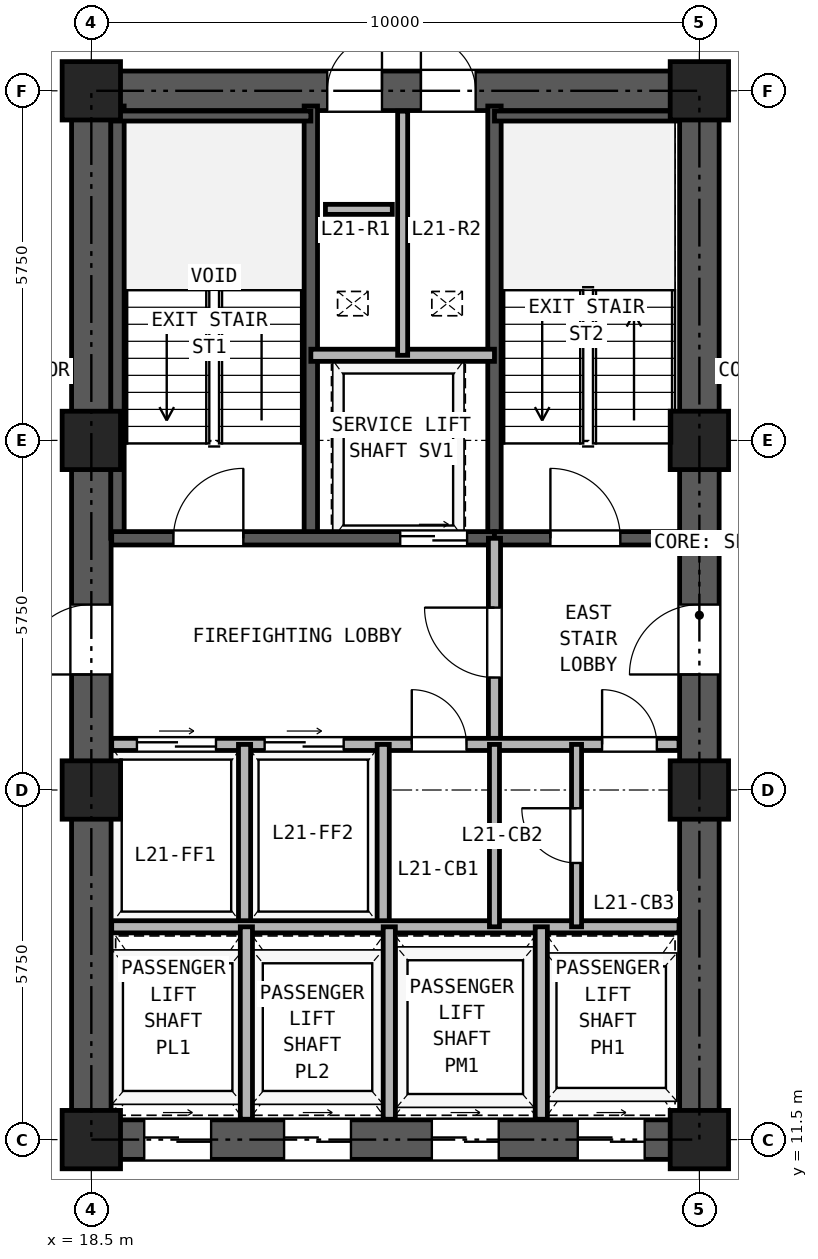
"""IFC4 building model, lengths in metres.
Left out: names, types, materials, properties, quantities, classifications, styles, units other than length and angle.
Written with IfcOpenShell. Run it as: python <this file> out.ifc"""

import sys

from ifc_helpers import new_model, si_unit, direction, frame, frame_2d, origin, origin_2d, place, context, subcontext, project, spatial, rectangle, hollow_rectangle, extrude, source, transform, mapped, element, fill, save


model = new_model("IFC4")
c1 = context("Model", 3, precision=1e-05, world=origin(), true_north=direction((0.0, 1.0)))
c2 = subcontext(c1, "Body", "Model", "MODEL_VIEW")
j1 = project(units=[si_unit("LENGTHUNIT", "METRE"), si_unit("PLANEANGLEUNIT", "RADIAN")], contexts=[c1])
p1 = place(None, origin())
s1 = spatial("IfcSite", under=j1, at=p1, CompositionType="ELEMENT")
p2 = place(p1, origin())
s2 = spatial("IfcBuilding", under=s1, at=p2, CompositionType="ELEMENT")
p3 = place(p2, frame((0.0, 0.0, 81.0)))
s3 = spatial("IfcBuildingStorey", under=s2, at=p3, CompositionType="ELEMENT", Elevation=81.0)
m1 = source(origin(), c2, "Body", "SweptSolid", [
    extrude(hollow_rectangle(XDim=0.96, YDim=0.96, WallThickness=0.06, at=origin_2d()), origin(), (0.0, 0.0, 1.0), 3.32),
])
for number, where, z_axis, x_axis in (
    (1, (18.5, 11.5, 0.0), (0.0, 0.0, 1.0), (1.0, 0.0, 0.0)),
    (2, (18.5, 17.25, 0.0), (0.0, 0.0, 1.0), (1.0, 0.0, 0.0)),
    (3, (18.5, 23.0, 0.0), (0.0, 0.0, 1.0), (1.0, 0.0, 0.0)),
    (4, (18.5, 28.75, 0.0), (0.0, 0.0, 1.0), (1.0, 0.0, 0.0)),
    (5, (28.5, 11.5, 0.0), (0.0, 0.0, 1.0), (1.0, 0.0, 0.0)),
    (6, (28.5, 17.25, 0.0), (0.0, 0.0, 1.0), (1.0, 0.0, 0.0)),
    (7, (28.5, 23.0, 0.0), (0.0, 0.0, 1.0), (1.0, 0.0, 0.0)),
    (8, (28.5, 28.75, 0.0), (0.0, 0.0, 1.0), (1.0, 0.0, 0.0)),
):
    element("IfcColumn", number, at=place(p3, frame(where, z_axis=z_axis, x_axis=x_axis)), inside=s3, PredefinedType="COLUMN", context=c2, shape_type="MappedRepresentation", body=[
        mapped(m1, transform((0.0, 0.0, 0.0), x_axis=(1.0, 0.0, 0.0), y_axis=(0.0, 1.0, 0.0), z_axis=(0.0, 0.0, 1.0), scale=1.0)),
    ])
p4 = place(p3, frame((18.175, 11.5, 0.0), z_axis=(0.0, 0.0, 1.0), x_axis=(1.0, 0.0, 0.0)))
e9 = element("IfcWall", 9, at=p4, inside=s3, PredefinedType="SHEAR", context=c2, shape_type="SweptSolid", body=[
    extrude(rectangle(XDim=10.65, YDim=0.65, at=frame_2d((5.325, 0.0))), origin(), (0.0, 0.0, 1.0), 3.32),
])
p5 = place(p4, frame((1.195, 0.0, 0.0)))
e10 = element("IfcOpeningElement", 10, at=p5, cuts=e9, PredefinedType="OPENING", context=c2, shape_type="SweptSolid", body=[
    extrude(rectangle(XDim=1.1, YDim=2.25, at=frame_2d((0.55, 1.125))), frame((0.0, 0.335, 0.0), z_axis=(0.0, -1.0, 0.0), x_axis=(1.0, 0.0, 0.0)), (0.0, 0.0, 1.0), 0.67),
])
p6 = place(p4, frame((3.495, 0.0, 0.0)))
e11 = element("IfcOpeningElement", 11, at=p6, cuts=e9, PredefinedType="OPENING", context=c2, shape_type="SweptSolid", body=[
    extrude(rectangle(XDim=1.1, YDim=2.25, at=frame_2d((0.55, 1.125))), frame((0.0, 0.335, 0.0), z_axis=(0.0, -1.0, 0.0), x_axis=(1.0, 0.0, 0.0)), (0.0, 0.0, 1.0), 0.67),
])
p7 = place(p4, frame((5.925, 0.0, 0.0)))
e12 = element("IfcOpeningElement", 12, at=p7, cuts=e9, PredefinedType="OPENING", context=c2, shape_type="SweptSolid", body=[
    extrude(rectangle(XDim=1.1, YDim=2.25, at=frame_2d((0.55, 1.125))), frame((0.0, 0.335, 0.0), z_axis=(0.0, -1.0, 0.0), x_axis=(1.0, 0.0, 0.0)), (0.0, 0.0, 1.0), 0.67),
])
p8 = place(p4, frame((8.325, 0.0, 0.0)))
e13 = element("IfcOpeningElement", 13, at=p8, cuts=e9, PredefinedType="OPENING", context=c2, shape_type="SweptSolid", body=[
    extrude(rectangle(XDim=1.1, YDim=2.25, at=frame_2d((0.55, 1.125))), frame((0.0, 0.335, 0.0), z_axis=(0.0, -1.0, 0.0), x_axis=(1.0, 0.0, 0.0)), (0.0, 0.0, 1.0), 0.67),
])
p9 = place(p3, frame((18.175, 28.75, 0.0), z_axis=(0.0, 0.0, 1.0), x_axis=(1.0, 0.0, 0.0)))
e14 = element("IfcWall", 14, at=p9, inside=s3, PredefinedType="SHEAR", context=c2, shape_type="SweptSolid", body=[
    extrude(rectangle(XDim=10.65, YDim=0.65, at=frame_2d((5.325, 0.0))), origin(), (0.0, 0.0, 1.0), 3.32),
])
p10 = place(p9, frame((4.205, 0.0, 0.0)))
e15 = element("IfcOpeningElement", 15, at=p10, cuts=e14, PredefinedType="OPENING", context=c2, shape_type="SweptSolid", body=[
    extrude(rectangle(XDim=0.9, YDim=2.05, at=frame_2d((0.45, 1.025))), frame((0.0, 0.335, 0.0), z_axis=(0.0, -1.0, 0.0), x_axis=(1.0, 0.0, 0.0)), (0.0, 0.0, 1.0), 0.67),
])
p11 = place(p9, frame((5.745, 0.0, 0.0)))
e16 = element("IfcOpeningElement", 16, at=p11, cuts=e14, PredefinedType="OPENING", context=c2, shape_type="SweptSolid", body=[
    extrude(rectangle(XDim=0.9, YDim=2.05, at=frame_2d((0.45, 1.025))), frame((0.0, 0.335, 0.0), z_axis=(0.0, -1.0, 0.0), x_axis=(1.0, 0.0, 0.0)), (0.0, 0.0, 1.0), 0.67),
])
p12 = place(p3, frame((18.5, 11.825, 0.0), z_axis=(0.0, 0.0, 1.0), x_axis=(0.0, 1.0, 0.0)))
e17 = element("IfcWall", 17, at=p12, inside=s3, PredefinedType="SHEAR", context=c2, shape_type="SweptSolid", body=[
    extrude(rectangle(XDim=16.6, YDim=0.65, at=frame_2d((8.3, 0.0))), origin(), (0.0, 0.0, 1.0), 3.32),
])
p13 = place(p12, frame((7.325, 0.0, 0.0)))
e18 = element("IfcOpeningElement", 18, at=p13, cuts=e17, PredefinedType="OPENING", context=c2, shape_type="SweptSolid", body=[
    extrude(rectangle(XDim=1.15, YDim=2.2, at=frame_2d((0.575, 1.1))), frame((0.0, 0.335, 0.0), z_axis=(0.0, -1.0, 0.0), x_axis=(1.0, 0.0, 0.0)), (0.0, 0.0, 1.0), 0.67),
])
p14 = place(p3, frame((28.5, 11.825, 0.0), z_axis=(0.0, 0.0, 1.0), x_axis=(0.0, 1.0, 0.0)))
e19 = element("IfcWall", 19, at=p14, inside=s3, PredefinedType="SHEAR", context=c2, shape_type="SweptSolid", body=[
    extrude(rectangle(XDim=16.6, YDim=0.65, at=frame_2d((8.3, 0.0))), origin(), (0.0, 0.0, 1.0), 3.32),
])
p15 = place(p14, frame((7.325, 0.0, 0.0)))
e20 = element("IfcOpeningElement", 20, at=p15, cuts=e19, PredefinedType="OPENING", context=c2, shape_type="SweptSolid", body=[
    extrude(rectangle(XDim=1.15, YDim=2.2, at=frame_2d((0.575, 1.1))), frame((0.0, 0.335, 0.0), z_axis=(0.0, -1.0, 0.0), x_axis=(1.0, 0.0, 0.0)), (0.0, 0.0, 1.0), 0.67),
])
for number, where, z_axis, x_axis in (
    (21, (18.93, 21.39, 0.0), (0.0, 0.0, 1.0), (0.0, 1.0, 0.0)),
    (22, (22.11, 21.39, 0.0), (0.0, 0.0, 1.0), (0.0, 1.0, 0.0)),
    (23, (25.13, 21.39, 0.0), (0.0, 0.0, 1.0), (0.0, 1.0, 0.0)),
):
    element("IfcWall", number, at=place(p3, frame(where, z_axis=z_axis, x_axis=x_axis)), inside=s3, PredefinedType="SOLIDWALL", context=c2, shape_type="SweptSolid", body=[
        extrude(rectangle(XDim=7.11, YDim=0.22, at=frame_2d((3.555, 0.0))), origin(), (0.0, 0.0, 1.0), 3.32),
    ])
p16 = place(p3, frame((18.835, 28.335, 0.0), z_axis=(0.0, 0.0, 1.0), x_axis=(1.0, 0.0, 0.0)))
e24 = element("IfcWall", 24, at=p16, inside=s3, PredefinedType="PARTITIONING", context=c2, shape_type="SweptSolid", body=[
    extrude(rectangle(XDim=3.275, YDim=0.165, at=frame_2d((1.638, 0.0))), origin(), (0.0, 0.0, 1.0), 3.32),
])
p17 = place(p3, frame((25.13, 28.335, 0.0), z_axis=(0.0, 0.0, 1.0), x_axis=(1.0, 0.0, 0.0)))
e25 = element("IfcWall", 25, at=p17, inside=s3, PredefinedType="PARTITIONING", context=c2, shape_type="SweptSolid", body=[
    extrude(rectangle(XDim=3.035, YDim=0.165, at=frame_2d((1.518, 0.0))), origin(), (0.0, 0.0, 1.0), 3.32),
])
p18 = place(p3, frame((18.835, 21.39, 0.0), z_axis=(0.0, 0.0, 1.0), x_axis=(1.0, 0.0, 0.0)))
e26 = element("IfcWall", 26, at=p18, inside=s3, PredefinedType="SOLIDWALL", context=c2, shape_type="SweptSolid", body=[
    extrude(rectangle(XDim=6.295, YDim=0.22, at=frame_2d((3.147, 0.0))), origin(), (0.0, 0.0, 1.0), 3.32),
])
p19 = place(p18, frame((1.015, 0.0, 0.0)))
e27 = element("IfcOpeningElement", 27, at=p19, cuts=e26, PredefinedType="OPENING", context=c2, shape_type="SweptSolid", body=[
    extrude(rectangle(XDim=1.15, YDim=2.2, at=frame_2d((0.575, 1.1))), frame((0.0, 0.12, 0.0), z_axis=(0.0, -1.0, 0.0), x_axis=(1.0, 0.0, 0.0)), (0.0, 0.0, 1.0), 0.24),
])
p20 = place(p18, frame((4.745, 0.0, 0.0)))
e28 = element("IfcOpeningElement", 28, at=p20, cuts=e26, PredefinedType="OPENING", context=c2, shape_type="SweptSolid", body=[
    extrude(rectangle(XDim=1.1, YDim=2.25, at=frame_2d((0.55, 1.125))), frame((0.0, 0.12, 0.0), z_axis=(0.0, -1.0, 0.0), x_axis=(1.0, 0.0, 0.0)), (0.0, 0.0, 1.0), 0.24),
])
p21 = place(p3, frame((25.13, 21.39, 0.0), z_axis=(0.0, 0.0, 1.0), x_axis=(1.0, 0.0, 0.0)))
e29 = element("IfcWall", 29, at=p21, inside=s3, PredefinedType="SOLIDWALL", context=c2, shape_type="SweptSolid", body=[
    extrude(rectangle(XDim=3.035, YDim=0.22, at=frame_2d((1.518, 0.0))), origin(), (0.0, 0.0, 1.0), 3.32),
])
p22 = place(p21, frame((0.92, 0.0, 0.0)))
e30 = element("IfcOpeningElement", 30, at=p22, cuts=e29, PredefinedType="OPENING", context=c2, shape_type="SweptSolid", body=[
    extrude(rectangle(XDim=1.15, YDim=2.2, at=frame_2d((0.575, 1.1))), frame((0.0, 0.12, 0.0), z_axis=(0.0, -1.0, 0.0), x_axis=(1.0, 0.0, 0.0)), (0.0, 0.0, 1.0), 0.24),
])
p23 = place(p3, frame((22.11, 24.4, 0.0), z_axis=(0.0, 0.0, 1.0), x_axis=(1.0, 0.0, 0.0)))
e31 = element("IfcWall", 31, at=p23, inside=s3, PredefinedType="PARTITIONING", context=c2, shape_type="SweptSolid", body=[
    extrude(rectangle(XDim=3.02, YDim=0.2, at=frame_2d((1.51, 0.0))), origin(), (0.0, 0.0, 1.0), 3.32),
])
p24 = place(p3, frame((23.62, 24.4, 0.0), z_axis=(0.0, 0.0, 1.0), x_axis=(0.0, 1.0, 0.0)))
e32 = element("IfcWall", 32, at=p24, inside=s3, PredefinedType="PARTITIONING", context=c2, shape_type="SweptSolid", body=[
    extrude(rectangle(XDim=4.015, YDim=0.165, at=frame_2d((2.008, 0.0))), origin(), (0.0, 0.0, 1.0), 3.32),
])
p25 = place(p3, frame((25.13, 18.0, 0.0), z_axis=(0.0, 0.0, 1.0), x_axis=(0.0, 1.0, 0.0)))
e33 = element("IfcWall", 33, at=p25, inside=s3, PredefinedType="PARTITIONING", context=c2, shape_type="SweptSolid", body=[
    extrude(rectangle(XDim=3.39, YDim=0.2, at=frame_2d((1.695, 0.0))), origin(), (0.0, 0.0, 1.0), 3.32),
])
p26 = place(p25, frame((1.1, 0.0, 0.0)))
e34 = element("IfcOpeningElement", 34, at=p26, cuts=e33, PredefinedType="OPENING", context=c2, shape_type="SweptSolid", body=[
    extrude(rectangle(XDim=1.15, YDim=2.2, at=frame_2d((0.575, 1.1))), frame((0.0, 0.11, 0.0), z_axis=(0.0, -1.0, 0.0), x_axis=(1.0, 0.0, 0.0)), (0.0, 0.0, 1.0), 0.22),
])
p27 = place(p3, frame((18.835, 18.0, 0.0), z_axis=(0.0, 0.0, 1.0), x_axis=(1.0, 0.0, 0.0)))
e35 = element("IfcWall", 35, at=p27, inside=s3, PredefinedType="PARTITIONING", context=c2, shape_type="SweptSolid", body=[
    extrude(rectangle(XDim=9.33, YDim=0.2, at=frame_2d((4.665, 0.0))), origin(), (0.0, 0.0, 1.0), 3.32),
])
p28 = place(p27, frame((0.415, 0.0, 0.0)))
e36 = element("IfcOpeningElement", 36, at=p28, cuts=e35, PredefinedType="OPENING", context=c2, shape_type="SweptSolid", body=[
    extrude(rectangle(XDim=1.3, YDim=2.3, at=frame_2d((0.65, 1.15))), frame((0.0, 0.11, 0.0), z_axis=(0.0, -1.0, 0.0), x_axis=(1.0, 0.0, 0.0)), (0.0, 0.0, 1.0), 0.22),
])
p29 = place(p27, frame((2.515, 0.0, 0.0)))
e37 = element("IfcOpeningElement", 37, at=p29, cuts=e35, PredefinedType="OPENING", context=c2, shape_type="SweptSolid", body=[
    extrude(rectangle(XDim=1.3, YDim=2.3, at=frame_2d((0.65, 1.15))), frame((0.0, 0.11, 0.0), z_axis=(0.0, -1.0, 0.0), x_axis=(1.0, 0.0, 0.0)), (0.0, 0.0, 1.0), 0.22),
])
p30 = place(p27, frame((4.935, 0.0, 0.0)))
e38 = element("IfcOpeningElement", 38, at=p30, cuts=e35, PredefinedType="OPENING", context=c2, shape_type="SweptSolid", body=[
    extrude(rectangle(XDim=0.9, YDim=2.05, at=frame_2d((0.45, 1.025))), frame((0.0, 0.11, 0.0), z_axis=(0.0, -1.0, 0.0), x_axis=(1.0, 0.0, 0.0)), (0.0, 0.0, 1.0), 0.22),
])
p31 = place(p27, frame((8.065, 0.0, 0.0)))
e39 = element("IfcOpeningElement", 39, at=p31, cuts=e35, PredefinedType="OPENING", context=c2, shape_type="SweptSolid", body=[
    extrude(rectangle(XDim=0.9, YDim=2.05, at=frame_2d((0.45, 1.025))), frame((0.0, 0.11, 0.0), z_axis=(0.0, -1.0, 0.0), x_axis=(1.0, 0.0, 0.0)), (0.0, 0.0, 1.0), 0.22),
])
for number, where, z_axis, x_axis in (
    (40, (21.02, 15.0, 0.0), (0.0, 0.0, 1.0), (0.0, 1.0, 0.0)),
    (41, (23.3, 15.0, 0.0), (0.0, 0.0, 1.0), (0.0, 1.0, 0.0)),
):
    element("IfcWall", number, at=place(p3, frame(where, z_axis=z_axis, x_axis=x_axis)), inside=s3, PredefinedType="PARTITIONING", context=c2, shape_type="SweptSolid", body=[
        extrude(rectangle(XDim=3.0, YDim=0.2, at=frame_2d((1.5, 0.0))), origin(), (0.0, 0.0, 1.0), 3.32),
    ])
p32 = place(p3, frame((18.835, 15.0, 0.0), z_axis=(0.0, 0.0, 1.0), x_axis=(1.0, 0.0, 0.0)))
e42 = element("IfcWall", 42, at=p32, inside=s3, PredefinedType="PARTITIONING", context=c2, shape_type="SweptSolid", body=[
    extrude(rectangle(XDim=9.33, YDim=0.2, at=frame_2d((4.665, 0.0))), origin(), (0.0, 0.0, 1.0), 3.32),
])
p33 = place(p3, frame((25.13, 15.0, 0.0), z_axis=(0.0, 0.0, 1.0), x_axis=(0.0, 1.0, 0.0)))
e43 = element("IfcWall", 43, at=p33, inside=s3, PredefinedType="PARTITIONING", context=c2, shape_type="SweptSolid", body=[
    extrude(rectangle(XDim=3.0, YDim=0.165, at=frame_2d((1.5, 0.0))), origin(), (0.0, 0.0, 1.0), 3.32),
])
p34 = place(p3, frame((26.48, 15.0, 0.0), z_axis=(0.0, 0.0, 1.0), x_axis=(0.0, 1.0, 0.0)))
e44 = element("IfcWall", 44, at=p34, inside=s3, PredefinedType="PARTITIONING", context=c2, shape_type="SweptSolid", body=[
    extrude(rectangle(XDim=3.0, YDim=0.165, at=frame_2d((1.5, 0.0))), origin(), (0.0, 0.0, 1.0), 3.32),
])
p35 = place(p34, frame((1.05, 0.0, 0.0)))
e45 = element("IfcOpeningElement", 45, at=p35, cuts=e44, PredefinedType="OPENING", context=c2, shape_type="SweptSolid", body=[
    extrude(rectangle(XDim=0.9, YDim=2.05, at=frame_2d((0.45, 1.025))), frame((0.0, 0.093, 0.0), z_axis=(0.0, -1.0, 0.0), x_axis=(1.0, 0.0, 0.0)), (0.0, 0.0, 1.0), 0.185),
])
for number, where, z_axis, x_axis in (
    (46, (21.05, 11.835, 0.0), (0.0, 0.0, 1.0), (0.0, 1.0, 0.0)),
    (47, (23.4, 11.835, 0.0), (0.0, 0.0, 1.0), (0.0, 1.0, 0.0)),
    (48, (25.9, 11.835, 0.0), (0.0, 0.0, 1.0), (0.0, 1.0, 0.0)),
):
    element("IfcWall", number, at=place(p3, frame(where, z_axis=z_axis, x_axis=x_axis)), inside=s3, PredefinedType="PARTITIONING", context=c2, shape_type="SweptSolid", body=[
        extrude(rectangle(XDim=3.165, YDim=0.2, at=frame_2d((1.583, 0.0))), origin(), (0.0, 0.0, 1.0), 3.32),
    ])
p36 = place(p3, frame((22.35, 26.8, 0.0), z_axis=(0.0, 0.0, 1.0), x_axis=(1.0, 0.0, 0.0)))
e49 = element("IfcWall", 49, at=p36, inside=s3, PredefinedType="PARTITIONING", context=c2, shape_type="SweptSolid", body=[
    extrude(rectangle(XDim=1.1, YDim=0.165, at=frame_2d((0.55, 0.0))), origin(), (0.0, 0.0, 1.0), 3.32),
])
p37 = place(p19, frame((1.15, 0.0, 0.0), z_axis=(0.0, 0.0, 1.0), x_axis=(-1.0, 0.0, 0.0)))
e50 = element("IfcDoor", 50, at=p37, inside=s3, OperationType="SINGLE_SWING_RIGHT", PredefinedType="DOOR", context=c2, shape_type="SweptSolid", body=[
    extrude(rectangle(XDim=1.15, YDim=2.2, at=frame_2d((0.575, 1.1))), frame((0.0, 0.025, 0.0), z_axis=(0.0, -1.0, 0.0), x_axis=(1.0, 0.0, 0.0)), (0.0, 0.0, 1.0), 0.05),
])
fill(e27, e50)
p38 = place(p22, frame((1.15, 0.0, 0.0), z_axis=(0.0, 0.0, 1.0), x_axis=(-1.0, 0.0, 0.0)))
e51 = element("IfcDoor", 51, at=p38, inside=s3, OperationType="SINGLE_SWING_LEFT", PredefinedType="DOOR", context=c2, shape_type="SweptSolid", body=[
    extrude(rectangle(XDim=1.15, YDim=2.2, at=frame_2d((0.575, 1.1))), frame((0.0, 0.025, 0.0), z_axis=(0.0, -1.0, 0.0), x_axis=(1.0, 0.0, 0.0)), (0.0, 0.0, 1.0), 0.05),
])
fill(e30, e51)
p39 = place(p20, frame((1.1, 0.0, 0.0), z_axis=(0.0, 0.0, 1.0), x_axis=(-1.0, 0.0, 0.0)))
e52 = element("IfcDoor", 52, at=p39, inside=s3, OperationType="DOUBLE_DOOR_SLIDING", PredefinedType="DOOR", context=c2, shape_type="SweptSolid", body=[
    extrude(rectangle(XDim=1.1, YDim=2.25, at=frame_2d((0.55, 1.125))), frame((0.0, 0.025, 0.0), z_axis=(0.0, -1.0, 0.0), x_axis=(1.0, 0.0, 0.0)), (0.0, 0.0, 1.0), 0.05),
])
fill(e28, e52)
p40 = place(p26, origin())
e53 = element("IfcDoor", 53, at=p40, inside=s3, OperationType="SINGLE_SWING_RIGHT", PredefinedType="DOOR", context=c2, shape_type="SweptSolid", body=[
    extrude(rectangle(XDim=1.15, YDim=2.2, at=frame_2d((0.575, 1.1))), frame((0.0, 0.025, 0.0), z_axis=(0.0, -1.0, 0.0), x_axis=(1.0, 0.0, 0.0)), (0.0, 0.0, 1.0), 0.05),
])
fill(e34, e53)
p41 = place(p28, origin())
e54 = element("IfcDoor", 54, at=p41, inside=s3, OperationType="DOUBLE_DOOR_SLIDING", PredefinedType="DOOR", context=c2, shape_type="SweptSolid", body=[
    extrude(rectangle(XDim=1.3, YDim=2.3, at=frame_2d((0.65, 1.15))), frame((0.0, 0.025, 0.0), z_axis=(0.0, -1.0, 0.0), x_axis=(1.0, 0.0, 0.0)), (0.0, 0.0, 1.0), 0.05),
])
fill(e36, e54)
p42 = place(p29, origin())
e55 = element("IfcDoor", 55, at=p42, inside=s3, OperationType="DOUBLE_DOOR_SLIDING", PredefinedType="DOOR", context=c2, shape_type="SweptSolid", body=[
    extrude(rectangle(XDim=1.3, YDim=2.3, at=frame_2d((0.65, 1.15))), frame((0.0, 0.025, 0.0), z_axis=(0.0, -1.0, 0.0), x_axis=(1.0, 0.0, 0.0)), (0.0, 0.0, 1.0), 0.05),
])
fill(e37, e55)
p43 = place(p30, frame((0.9, 0.0, 0.0), z_axis=(0.0, 0.0, 1.0), x_axis=(-1.0, 0.0, 0.0)))
e56 = element("IfcDoor", 56, at=p43, inside=s3, OperationType="SINGLE_SWING_LEFT", PredefinedType="DOOR", context=c2, shape_type="SweptSolid", body=[
    extrude(rectangle(XDim=0.9, YDim=2.05, at=frame_2d((0.45, 1.025))), frame((0.0, 0.025, 0.0), z_axis=(0.0, -1.0, 0.0), x_axis=(1.0, 0.0, 0.0)), (0.0, 0.0, 1.0), 0.05),
])
fill(e38, e56)
p44 = place(p35, origin())
e57 = element("IfcDoor", 57, at=p44, inside=s3, OperationType="SINGLE_SWING_RIGHT", PredefinedType="DOOR", context=c2, shape_type="SweptSolid", body=[
    extrude(rectangle(XDim=0.9, YDim=2.05, at=frame_2d((0.45, 1.025))), frame((0.0, 0.025, 0.0), z_axis=(0.0, -1.0, 0.0), x_axis=(1.0, 0.0, 0.0)), (0.0, 0.0, 1.0), 0.05),
])
fill(e45, e57)
p45 = place(p31, frame((0.9, 0.0, 0.0), z_axis=(0.0, 0.0, 1.0), x_axis=(-1.0, 0.0, 0.0)))
e58 = element("IfcDoor", 58, at=p45, inside=s3, OperationType="SINGLE_SWING_LEFT", PredefinedType="DOOR", context=c2, shape_type="SweptSolid", body=[
    extrude(rectangle(XDim=0.9, YDim=2.05, at=frame_2d((0.45, 1.025))), frame((0.0, 0.025, 0.0), z_axis=(0.0, -1.0, 0.0), x_axis=(1.0, 0.0, 0.0)), (0.0, 0.0, 1.0), 0.05),
])
fill(e39, e58)
p46 = place(p13, frame((1.15, 0.0, 0.0), z_axis=(0.0, 0.0, 1.0), x_axis=(-1.0, 0.0, 0.0)))
e59 = element("IfcDoor", 59, at=p46, inside=s3, OperationType="SINGLE_SWING_LEFT", PredefinedType="DOOR", context=c2, shape_type="SweptSolid", body=[
    extrude(rectangle(XDim=1.15, YDim=2.2, at=frame_2d((0.575, 1.1))), frame((0.0, 0.025, 0.0), z_axis=(0.0, -1.0, 0.0), x_axis=(1.0, 0.0, 0.0)), (0.0, 0.0, 1.0), 0.05),
])
fill(e18, e59)
p47 = place(p15, origin())
e60 = element("IfcDoor", 60, at=p47, inside=s3, OperationType="SINGLE_SWING_LEFT", PredefinedType="DOOR", context=c2, shape_type="SweptSolid", body=[
    extrude(rectangle(XDim=1.15, YDim=2.2, at=frame_2d((0.575, 1.1))), frame((0.0, 0.025, 0.0), z_axis=(0.0, -1.0, 0.0), x_axis=(1.0, 0.0, 0.0)), (0.0, 0.0, 1.0), 0.05),
])
fill(e20, e60)
p48 = place(p10, origin())
e61 = element("IfcDoor", 61, at=p48, inside=s3, OperationType="SINGLE_SWING_RIGHT", PredefinedType="DOOR", context=c2, shape_type="SweptSolid", body=[
    extrude(rectangle(XDim=0.9, YDim=2.05, at=frame_2d((0.45, 1.025))), frame((0.0, 0.025, 0.0), z_axis=(0.0, -1.0, 0.0), x_axis=(1.0, 0.0, 0.0)), (0.0, 0.0, 1.0), 0.05),
])
fill(e15, e61)
p49 = place(p11, origin())
e62 = element("IfcDoor", 62, at=p49, inside=s3, OperationType="SINGLE_SWING_LEFT", PredefinedType="DOOR", context=c2, shape_type="SweptSolid", body=[
    extrude(rectangle(XDim=0.9, YDim=2.05, at=frame_2d((0.45, 1.025))), frame((0.0, 0.025, 0.0), z_axis=(0.0, -1.0, 0.0), x_axis=(1.0, 0.0, 0.0)), (0.0, 0.0, 1.0), 0.05),
])
fill(e16, e62)
p50 = place(p5, frame((1.1, 0.0, 0.0), z_axis=(0.0, 0.0, 1.0), x_axis=(-1.0, 0.0, 0.0)))
e63 = element("IfcDoor", 63, at=p50, inside=s3, OperationType="DOUBLE_DOOR_SLIDING", PredefinedType="DOOR", context=c2, shape_type="SweptSolid", body=[
    extrude(rectangle(XDim=1.1, YDim=2.25, at=frame_2d((0.55, 1.125))), frame((0.0, 0.025, 0.0), z_axis=(0.0, -1.0, 0.0), x_axis=(1.0, 0.0, 0.0)), (0.0, 0.0, 1.0), 0.05),
])
fill(e10, e63)
p51 = place(p6, frame((1.1, 0.0, 0.0), z_axis=(0.0, 0.0, 1.0), x_axis=(-1.0, 0.0, 0.0)))
e64 = element("IfcDoor", 64, at=p51, inside=s3, OperationType="DOUBLE_DOOR_SLIDING", PredefinedType="DOOR", context=c2, shape_type="SweptSolid", body=[
    extrude(rectangle(XDim=1.1, YDim=2.25, at=frame_2d((0.55, 1.125))), frame((0.0, 0.025, 0.0), z_axis=(0.0, -1.0, 0.0), x_axis=(1.0, 0.0, 0.0)), (0.0, 0.0, 1.0), 0.05),
])
fill(e11, e64)
p52 = place(p7, frame((1.1, 0.0, 0.0), z_axis=(0.0, 0.0, 1.0), x_axis=(-1.0, 0.0, 0.0)))
e65 = element("IfcDoor", 65, at=p52, inside=s3, OperationType="DOUBLE_DOOR_SLIDING", PredefinedType="DOOR", context=c2, shape_type="SweptSolid", body=[
    extrude(rectangle(XDim=1.1, YDim=2.25, at=frame_2d((0.55, 1.125))), frame((0.0, 0.025, 0.0), z_axis=(0.0, -1.0, 0.0), x_axis=(1.0, 0.0, 0.0)), (0.0, 0.0, 1.0), 0.05),
])
fill(e12, e65)
p53 = place(p8, frame((1.1, 0.0, 0.0), z_axis=(0.0, 0.0, 1.0), x_axis=(-1.0, 0.0, 0.0)))
e66 = element("IfcDoor", 66, at=p53, inside=s3, OperationType="DOUBLE_DOOR_SLIDING", PredefinedType="DOOR", context=c2, shape_type="SweptSolid", body=[
    extrude(rectangle(XDim=1.1, YDim=2.25, at=frame_2d((0.55, 1.125))), frame((0.0, 0.025, 0.0), z_axis=(0.0, -1.0, 0.0), x_axis=(1.0, 0.0, 0.0)), (0.0, 0.0, 1.0), 0.05),
])
fill(e13, e66)
save(model, sys.argv[1])
